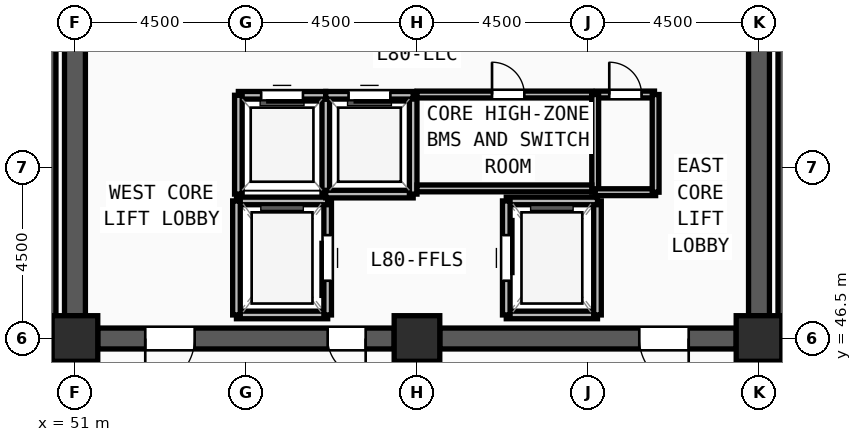
"""IFC4 building model, lengths in metres.
Left out: names, types, materials, properties, quantities, classifications, styles, units other than length and angle.
Written with IfcOpenShell. Run it as: python <this file> out.ifc"""

import sys

from ifc_helpers import new_model, si_unit, direction, frame, frame_2d, origin, origin_2d, place, context, subcontext, project, spatial, rectangle, extrude, source, transform, mapped, element, fill, save


model = new_model("IFC4")
c1 = context("Model", 3, precision=1e-05, world=origin(), true_north=direction((0.0, 1.0)))
c2 = subcontext(c1, "Body", "Model", "MODEL_VIEW")
j1 = project(units=[si_unit("LENGTHUNIT", "METRE"), si_unit("PLANEANGLEUNIT", "RADIAN")], contexts=[c1])
p1 = place(None, origin())
s1 = spatial("IfcSite", under=j1, at=p1, CompositionType="ELEMENT")
p2 = place(p1, origin())
s2 = spatial("IfcBuilding", under=s1, at=p2, CompositionType="ELEMENT")
p3 = place(p2, frame((0.0, 0.0, 309.0)))
s3 = spatial("IfcBuildingStorey", under=s2, at=p3, CompositionType="ELEMENT", Elevation=309.0)
m1 = source(origin(), c2, "Body", "SweptSolid", [
    extrude(rectangle(XDim=1.2, YDim=1.2, at=origin_2d()), origin(), (0.0, 0.0, 1.0), 3.75),
])
for number, where, z_axis, x_axis in (
    (1, (51.0, 46.5, 0.0), (0.0, 0.0, 1.0), (1.0, 0.0, 0.0)),
    (2, (60.0, 46.5, 0.0), (0.0, 0.0, 1.0), (1.0, 0.0, 0.0)),
    (3, (69.0, 46.5, 0.0), (0.0, 0.0, 1.0), (1.0, 0.0, 0.0)),
):
    element("IfcColumn", number, at=place(p3, frame(where, z_axis=z_axis, x_axis=x_axis)), inside=s3, PredefinedType="COLUMN", context=c2, shape_type="MappedRepresentation", body=[
        mapped(m1, transform((0.0, 0.0, 0.0), x_axis=(1.0, 0.0, 0.0), y_axis=(0.0, 1.0, 0.0), z_axis=(0.0, 0.0, 1.0), scale=1.0)),
    ])
p4 = place(p3, frame((69.0, 60.9, 0.0), z_axis=(0.0, 0.0, 1.0), x_axis=(0.0, -1.0, 0.0)))
e4 = element("IfcWall", 4, at=p4, inside=s3, PredefinedType="SHEAR", context=c2, shape_type="SweptSolid", body=[
    extrude(rectangle(XDim=13.8, YDim=0.55, at=frame_2d((6.9, 0.0))), origin(), (0.0, 0.0, 1.0), 3.57),
])
m2 = source(origin(), c2, "Body", "SweptSolid", [
    extrude(rectangle(XDim=1.2, YDim=2.2, at=frame_2d((0.6, 1.1))), frame((0.0, 0.285, 0.0), z_axis=(0.0, -1.0, 0.0), x_axis=(1.0, 0.0, 0.0)), (0.0, 0.0, 1.0), 0.57),
])
p5 = place(p4, frame((1.35, 0.0, 0.0)))
e5 = element("IfcOpeningElement", 5, at=p5, cuts=e4, PredefinedType="OPENING", context=c2, shape_type="MappedRepresentation", body=[
    mapped(m2, transform((0.0, 0.0, 0.0), x_axis=(1.0, 0.0, 0.0), y_axis=(0.0, 1.0, 0.0), z_axis=(0.0, 0.0, 1.0), scale=1.0)),
])
p6 = place(p3, frame((68.4, 46.5, 0.0), z_axis=(0.0, 0.0, 1.0), x_axis=(-1.0, 0.0, 0.0)))
e6 = element("IfcWall", 6, at=p6, inside=s3, PredefinedType="SHEAR", context=c2, shape_type="SweptSolid", body=[
    extrude(rectangle(XDim=7.8, YDim=0.55, at=frame_2d((3.9, 0.0))), origin(), (0.0, 0.0, 1.0), 3.57),
])
m3 = source(origin(), c2, "Body", "SweptSolid", [
    extrude(rectangle(XDim=1.3, YDim=2.2, at=frame_2d((0.65, 1.1))), frame((0.0, 0.285, 0.0), z_axis=(0.0, -1.0, 0.0), x_axis=(1.0, 0.0, 0.0)), (0.0, 0.0, 1.0), 0.57),
])
p7 = place(p6, frame((1.25, 0.0, 0.0)))
e7 = element("IfcOpeningElement", 7, at=p7, cuts=e6, PredefinedType="OPENING", context=c2, shape_type="MappedRepresentation", body=[
    mapped(m3, transform((0.0, 0.0, 0.0), x_axis=(1.0, 0.0, 0.0), y_axis=(0.0, 1.0, 0.0), z_axis=(0.0, 0.0, 1.0), scale=1.0)),
])
p8 = place(p3, frame((59.4, 46.5, 0.0), z_axis=(0.0, 0.0, 1.0), x_axis=(-1.0, 0.0, 0.0)))
e8 = element("IfcWall", 8, at=p8, inside=s3, PredefinedType="SHEAR", context=c2, shape_type="SweptSolid", body=[
    extrude(rectangle(XDim=7.8, YDim=0.55, at=frame_2d((3.9, 0.0))), origin(), (0.0, 0.0, 1.0), 3.57),
])
p9 = place(p8, frame((5.25, 0.0, 0.0)))
e9 = element("IfcOpeningElement", 9, at=p9, cuts=e8, PredefinedType="OPENING", context=c2, shape_type="MappedRepresentation", body=[
    mapped(m3, transform((0.0, 0.0, 0.0), x_axis=(1.0, 0.0, 0.0), y_axis=(0.0, 1.0, 0.0), z_axis=(0.0, 0.0, 1.0), scale=1.0)),
])
m4 = source(origin(), c2, "Body", "SweptSolid", [
    extrude(rectangle(XDim=1.0, YDim=2.2, at=frame_2d((0.5, 1.1))), frame((0.0, 0.285, 0.0), z_axis=(0.0, -1.0, 0.0), x_axis=(1.0, 0.0, 0.0)), (0.0, 0.0, 1.0), 0.57),
])
p10 = place(p8, frame((0.75, 0.0, 0.0)))
e10 = element("IfcOpeningElement", 10, at=p10, cuts=e8, PredefinedType="OPENING", context=c2, shape_type="MappedRepresentation", body=[
    mapped(m4, transform((0.0, 0.0, 0.0), x_axis=(1.0, 0.0, 0.0), y_axis=(0.0, 1.0, 0.0), z_axis=(0.0, 0.0, 1.0), scale=1.0)),
])
p11 = place(p3, frame((51.0, 47.1, 0.0), z_axis=(0.0, 0.0, 1.0), x_axis=(0.0, 1.0, 0.0)))
e11 = element("IfcWall", 11, at=p11, inside=s3, PredefinedType="SHEAR", context=c2, shape_type="SweptSolid", body=[
    extrude(rectangle(XDim=13.8, YDim=0.55, at=frame_2d((6.9, 0.0))), origin(), (0.0, 0.0, 1.0), 3.57),
])
for number, where, z_axis, x_axis in (
    (12, (50.38, 46.7, 0.0), (0.0, 0.0, 1.0), (0.0, 1.0, 0.0)),
    (13, (69.62, 54.52, 0.0), (0.0, 0.0, 1.0), (0.0, -1.0, 0.0)),
):
    element("IfcWall", number, at=place(p3, frame(where, z_axis=z_axis, x_axis=x_axis)), inside=s3, PredefinedType="SOLIDWALL", context=c2, shape_type="SweptSolid", body=[
        extrude(rectangle(XDim=7.82, YDim=0.24, at=frame_2d((3.91, 0.0))), origin(), (0.0, 0.0, 1.0), 3.57),
    ])
p12 = place(p3, frame((55.25, 47.12, 0.0), z_axis=(0.0, 0.0, 1.0), x_axis=(1.0, 0.0, 0.0)))
e14 = element("IfcWall", 14, at=p12, inside=s3, PredefinedType="SOLIDWALL", context=c2, shape_type="SweptSolid", body=[
    extrude(rectangle(XDim=2.4, YDim=0.2, at=frame_2d((1.2, 0.0))), origin(), (0.0, 0.0, 1.0), 3.57),
])
p13 = place(p3, frame((57.65, 47.12, 0.0), z_axis=(0.0, 0.0, 1.0), x_axis=(0.0, 1.0, 0.0)))
e15 = element("IfcWall", 15, at=p13, inside=s3, PredefinedType="SOLIDWALL", context=c2, shape_type="SweptSolid", body=[
    extrude(rectangle(XDim=3.0, YDim=0.2, at=frame_2d((1.5, 0.0))), origin(), (0.0, 0.0, 1.0), 3.57),
])
m5 = source(origin(), c2, "Body", "SweptSolid", [
    extrude(rectangle(XDim=1.2, YDim=2.3, at=frame_2d((0.6, 1.15))), frame((0.0, 0.11, 0.0), z_axis=(0.0, -1.0, 0.0), x_axis=(1.0, 0.0, 0.0)), (0.0, 0.0, 1.0), 0.22),
])
p14 = place(p13, frame((0.9, 0.0, 0.0)))
e16 = element("IfcOpeningElement", 16, at=p14, cuts=e15, PredefinedType="OPENING", context=c2, shape_type="MappedRepresentation", body=[
    mapped(m5, transform((0.0, 0.0, 0.0), x_axis=(1.0, 0.0, 0.0), y_axis=(0.0, 1.0, 0.0), z_axis=(0.0, 0.0, 1.0), scale=1.0)),
])
p15 = place(p3, frame((57.65, 50.12, 0.0), z_axis=(0.0, 0.0, 1.0), x_axis=(-1.0, 0.0, 0.0)))
e17 = element("IfcWall", 17, at=p15, inside=s3, PredefinedType="SOLIDWALL", context=c2, shape_type="SweptSolid", body=[
    extrude(rectangle(XDim=2.4, YDim=0.2, at=frame_2d((1.2, 0.0))), origin(), (0.0, 0.0, 1.0), 3.57),
])
p16 = place(p3, frame((55.25, 50.12, 0.0), z_axis=(0.0, 0.0, 1.0), x_axis=(0.0, -1.0, 0.0)))
e18 = element("IfcWall", 18, at=p16, inside=s3, PredefinedType="SOLIDWALL", context=c2, shape_type="SweptSolid", body=[
    extrude(rectangle(XDim=3.0, YDim=0.2, at=frame_2d((1.5, 0.0))), origin(), (0.0, 0.0, 1.0), 3.57),
])
p17 = place(p3, frame((62.35, 47.12, 0.0), z_axis=(0.0, 0.0, 1.0), x_axis=(1.0, 0.0, 0.0)))
e19 = element("IfcWall", 19, at=p17, inside=s3, PredefinedType="SOLIDWALL", context=c2, shape_type="SweptSolid", body=[
    extrude(rectangle(XDim=2.4, YDim=0.2, at=frame_2d((1.2, 0.0))), origin(), (0.0, 0.0, 1.0), 3.57),
])
p18 = place(p3, frame((64.75, 47.12, 0.0), z_axis=(0.0, 0.0, 1.0), x_axis=(0.0, 1.0, 0.0)))
e20 = element("IfcWall", 20, at=p18, inside=s3, PredefinedType="SOLIDWALL", context=c2, shape_type="SweptSolid", body=[
    extrude(rectangle(XDim=3.0, YDim=0.2, at=frame_2d((1.5, 0.0))), origin(), (0.0, 0.0, 1.0), 3.57),
])
p19 = place(p3, frame((64.75, 50.12, 0.0), z_axis=(0.0, 0.0, 1.0), x_axis=(-1.0, 0.0, 0.0)))
e21 = element("IfcWall", 21, at=p19, inside=s3, PredefinedType="SOLIDWALL", context=c2, shape_type="SweptSolid", body=[
    extrude(rectangle(XDim=2.4, YDim=0.2, at=frame_2d((1.2, 0.0))), origin(), (0.0, 0.0, 1.0), 3.57),
])
p20 = place(p3, frame((62.35, 50.12, 0.0), z_axis=(0.0, 0.0, 1.0), x_axis=(0.0, -1.0, 0.0)))
e22 = element("IfcWall", 22, at=p20, inside=s3, PredefinedType="SOLIDWALL", context=c2, shape_type="SweptSolid", body=[
    extrude(rectangle(XDim=3.0, YDim=0.2, at=frame_2d((1.5, 0.0))), origin(), (0.0, 0.0, 1.0), 3.57),
])
p21 = place(p20, frame((0.9, 0.0, 0.0)))
e23 = element("IfcOpeningElement", 23, at=p21, cuts=e22, PredefinedType="OPENING", context=c2, shape_type="MappedRepresentation", body=[
    mapped(m5, transform((0.0, 0.0, 0.0), x_axis=(1.0, 0.0, 0.0), y_axis=(0.0, 1.0, 0.0), z_axis=(0.0, 0.0, 1.0), scale=1.0)),
])
p22 = place(p3, frame((57.6, 50.3, 0.0), z_axis=(0.0, 0.0, 1.0), x_axis=(0.0, 1.0, 0.0)))
e24 = element("IfcWall", 24, at=p22, inside=s3, PredefinedType="SOLIDWALL", context=c2, shape_type="SweptSolid", body=[
    extrude(rectangle(XDim=2.6, YDim=0.2, at=frame_2d((1.3, 0.0))), origin(), (0.0, 0.0, 1.0), 3.57),
])
p23 = place(p3, frame((57.6, 52.9, 0.0), z_axis=(0.0, 0.0, 1.0), x_axis=(-1.0, 0.0, 0.0)))
e25 = element("IfcWall", 25, at=p23, inside=s3, PredefinedType="SOLIDWALL", context=c2, shape_type="SweptSolid", body=[
    extrude(rectangle(XDim=2.3, YDim=0.2, at=frame_2d((1.15, 0.0))), origin(), (0.0, 0.0, 1.0), 3.57),
])
m6 = source(origin(), c2, "Body", "SweptSolid", [
    extrude(rectangle(XDim=1.1, YDim=2.2, at=frame_2d((0.55, 1.1))), frame((0.0, 0.11, 0.0), z_axis=(0.0, -1.0, 0.0), x_axis=(1.0, 0.0, 0.0)), (0.0, 0.0, 1.0), 0.22),
])
p24 = place(p23, frame((0.6, 0.0, 0.0)))
e26 = element("IfcOpeningElement", 26, at=p24, cuts=e25, PredefinedType="OPENING", context=c2, shape_type="MappedRepresentation", body=[
    mapped(m6, transform((0.0, 0.0, 0.0), x_axis=(1.0, 0.0, 0.0), y_axis=(0.0, 1.0, 0.0), z_axis=(0.0, 0.0, 1.0), scale=1.0)),
])
p25 = place(p3, frame((55.3, 52.9, 0.0), z_axis=(0.0, 0.0, 1.0), x_axis=(0.0, -1.0, 0.0)))
e27 = element("IfcWall", 27, at=p25, inside=s3, PredefinedType="SOLIDWALL", context=c2, shape_type="SweptSolid", body=[
    extrude(rectangle(XDim=2.6, YDim=0.2, at=frame_2d((1.3, 0.0))), origin(), (0.0, 0.0, 1.0), 3.57),
])
p26 = place(p3, frame((57.6, 50.3, 0.0), z_axis=(0.0, 0.0, 1.0), x_axis=(1.0, 0.0, 0.0)))
e28 = element("IfcWall", 28, at=p26, inside=s3, PredefinedType="SOLIDWALL", context=c2, shape_type="SweptSolid", body=[
    extrude(rectangle(XDim=2.3, YDim=0.2, at=frame_2d((1.15, 0.0))), origin(), (0.0, 0.0, 1.0), 3.57),
])
p27 = place(p3, frame((59.9, 50.3, 0.0), z_axis=(0.0, 0.0, 1.0), x_axis=(0.0, 1.0, 0.0)))
e29 = element("IfcWall", 29, at=p27, inside=s3, PredefinedType="SOLIDWALL", context=c2, shape_type="SweptSolid", body=[
    extrude(rectangle(XDim=2.6, YDim=0.2, at=frame_2d((1.3, 0.0))), origin(), (0.0, 0.0, 1.0), 3.57),
])
p28 = place(p3, frame((59.9, 52.9, 0.0), z_axis=(0.0, 0.0, 1.0), x_axis=(-1.0, 0.0, 0.0)))
e30 = element("IfcWall", 30, at=p28, inside=s3, PredefinedType="SOLIDWALL", context=c2, shape_type="SweptSolid", body=[
    extrude(rectangle(XDim=2.3, YDim=0.2, at=frame_2d((1.15, 0.0))), origin(), (0.0, 0.0, 1.0), 3.57),
])
p29 = place(p28, frame((0.6, 0.0, 0.0)))
e31 = element("IfcOpeningElement", 31, at=p29, cuts=e30, PredefinedType="OPENING", context=c2, shape_type="MappedRepresentation", body=[
    mapped(m6, transform((0.0, 0.0, 0.0), x_axis=(1.0, 0.0, 0.0), y_axis=(0.0, 1.0, 0.0), z_axis=(0.0, 0.0, 1.0), scale=1.0)),
])
p30 = place(p3, frame((60.0, 52.92, 0.0), z_axis=(0.0, 0.0, 1.0), x_axis=(1.0, 0.0, 0.0)))
e32 = element("IfcWall", 32, at=p30, inside=s3, PredefinedType="PARTITIONING", context=c2, shape_type="SweptSolid", body=[
    extrude(rectangle(XDim=4.6, YDim=0.18, at=frame_2d((2.3, 0.0))), origin(), (0.0, 0.0, 1.0), 3.57),
])
m7 = source(origin(), c2, "Body", "SweptSolid", [
    extrude(rectangle(XDim=0.85, YDim=2.1, at=frame_2d((0.425, 1.05))), frame((0.0, 0.1, 0.0), z_axis=(0.0, -1.0, 0.0), x_axis=(1.0, 0.0, 0.0)), (0.0, 0.0, 1.0), 0.2),
])
p31 = place(p30, frame((1.975, 0.0, 0.0)))
e33 = element("IfcOpeningElement", 33, at=p31, cuts=e32, PredefinedType="OPENING", context=c2, shape_type="MappedRepresentation", body=[
    mapped(m7, transform((0.0, 0.0, 0.0), x_axis=(1.0, 0.0, 0.0), y_axis=(0.0, 1.0, 0.0), z_axis=(0.0, 0.0, 1.0), scale=1.0)),
])
p32 = place(p3, frame((64.72, 52.92, 0.0), z_axis=(0.0, 0.0, 1.0), x_axis=(1.0, 0.0, 0.0)))
e34 = element("IfcWall", 34, at=p32, inside=s3, PredefinedType="PARTITIONING", context=c2, shape_type="SweptSolid", body=[
    extrude(rectangle(XDim=1.53, YDim=0.18, at=frame_2d((0.765, 0.0))), origin(), (0.0, 0.0, 1.0), 3.57),
])
p33 = place(p32, frame((0.34, 0.0, 0.0)))
e35 = element("IfcOpeningElement", 35, at=p33, cuts=e34, PredefinedType="OPENING", context=c2, shape_type="MappedRepresentation", body=[
    mapped(m7, transform((0.0, 0.0, 0.0), x_axis=(1.0, 0.0, 0.0), y_axis=(0.0, 1.0, 0.0), z_axis=(0.0, 0.0, 1.0), scale=1.0)),
])
p34 = place(p3, frame((64.69, 50.35, 0.0), z_axis=(0.0, 0.0, 1.0), x_axis=(0.0, 1.0, 0.0)))
e36 = element("IfcWall", 36, at=p34, inside=s3, PredefinedType="PARTITIONING", context=c2, shape_type="SweptSolid", body=[
    extrude(rectangle(XDim=2.57, YDim=0.18, at=frame_2d((1.285, 0.0))), origin(), (0.0, 0.0, 1.0), 3.57),
])
p35 = place(p3, frame((64.69, 50.35, 0.0), z_axis=(0.0, 0.0, 1.0), x_axis=(1.0, 0.0, 0.0)))
e37 = element("IfcWall", 37, at=p35, inside=s3, PredefinedType="PARTITIONING", context=c2, shape_type="SweptSolid", body=[
    extrude(rectangle(XDim=1.59, YDim=0.18, at=frame_2d((0.795, 0.0))), origin(), (0.0, 0.0, 1.0), 3.57),
])
p36 = place(p3, frame((66.28, 50.35, 0.0), z_axis=(0.0, 0.0, 1.0), x_axis=(0.0, 1.0, 0.0)))
e38 = element("IfcWall", 38, at=p36, inside=s3, PredefinedType="PARTITIONING", context=c2, shape_type="SweptSolid", body=[
    extrude(rectangle(XDim=2.57, YDim=0.18, at=frame_2d((1.285, 0.0))), origin(), (0.0, 0.0, 1.0), 3.57),
])
p37 = place(p3, frame((60.0, 50.45, 0.0), z_axis=(0.0, 0.0, 1.0), x_axis=(1.0, 0.0, 0.0)))
e39 = element("IfcWall", 39, at=p37, inside=s3, PredefinedType="PARTITIONING", context=c2, shape_type="SweptSolid", body=[
    extrude(rectangle(XDim=4.6, YDim=0.18, at=frame_2d((2.3, 0.0))), origin(), (0.0, 0.0, 1.0), 3.57),
])
m8 = source(origin(), c2, "Body", "SweptSolid", [
    extrude(rectangle(XDim=1.3, YDim=2.2, at=frame_2d((0.65, 1.1))), frame((0.0, 0.025, 0.0), z_axis=(0.0, -1.0, 0.0), x_axis=(1.0, 0.0, 0.0)), (0.0, 0.0, 1.0), 0.05),
])
p38 = place(p9, origin())
e40 = element("IfcDoor", 40, at=p38, inside=s3, OperationType="SINGLE_SWING_RIGHT", PredefinedType="DOOR", context=c2, shape_type="MappedRepresentation", body=[
    mapped(m8, transform((0.0, 0.0, 0.0), x_axis=(1.0, 0.0, 0.0), y_axis=(0.0, 1.0, 0.0), z_axis=(0.0, 0.0, 1.0), scale=1.0)),
])
fill(e9, e40)
m9 = source(origin(), c2, "Body", "SweptSolid", [
    extrude(rectangle(XDim=1.0, YDim=2.2, at=frame_2d((0.5, 1.1))), frame((0.0, 0.025, 0.0), z_axis=(0.0, -1.0, 0.0), x_axis=(1.0, 0.0, 0.0)), (0.0, 0.0, 1.0), 0.05),
])
p39 = place(p10, origin())
e41 = element("IfcDoor", 41, at=p39, inside=s3, OperationType="SINGLE_SWING_LEFT", PredefinedType="DOOR", context=c2, shape_type="MappedRepresentation", body=[
    mapped(m9, transform((0.0, 0.0, 0.0), x_axis=(1.0, 0.0, 0.0), y_axis=(0.0, 1.0, 0.0), z_axis=(0.0, 0.0, 1.0), scale=1.0)),
])
fill(e10, e41)
p40 = place(p7, origin())
e42 = element("IfcDoor", 42, at=p40, inside=s3, OperationType="SINGLE_SWING_LEFT", PredefinedType="DOOR", context=c2, shape_type="MappedRepresentation", body=[
    mapped(m8, transform((0.0, 0.0, 0.0), x_axis=(1.0, 0.0, 0.0), y_axis=(0.0, 1.0, 0.0), z_axis=(0.0, 0.0, 1.0), scale=1.0)),
])
fill(e7, e42)
m10 = source(origin(), c2, "Body", "SweptSolid", [
    extrude(rectangle(XDim=1.2, YDim=2.3, at=frame_2d((0.6, 1.15))), frame((0.0, 0.025, 0.0), z_axis=(0.0, -1.0, 0.0), x_axis=(1.0, 0.0, 0.0)), (0.0, 0.0, 1.0), 0.05),
])
p41 = place(p14, origin())
e43 = element("IfcDoor", 43, at=p41, inside=s3, OperationType="SLIDING_TO_LEFT", PredefinedType="DOOR", context=c2, shape_type="MappedRepresentation", body=[
    mapped(m10, transform((0.0, 0.0, 0.0), x_axis=(1.0, 0.0, 0.0), y_axis=(0.0, 1.0, 0.0), z_axis=(0.0, 0.0, 1.0), scale=1.0)),
])
fill(e16, e43)
p42 = place(p21, origin())
e44 = element("IfcDoor", 44, at=p42, inside=s3, OperationType="SLIDING_TO_LEFT", PredefinedType="DOOR", context=c2, shape_type="MappedRepresentation", body=[
    mapped(m10, transform((0.0, 0.0, 0.0), x_axis=(1.0, 0.0, 0.0), y_axis=(0.0, 1.0, 0.0), z_axis=(0.0, 0.0, 1.0), scale=1.0)),
])
fill(e23, e44)
m11 = source(origin(), c2, "Body", "SweptSolid", [
    extrude(rectangle(XDim=1.1, YDim=2.2, at=frame_2d((0.55, 1.1))), frame((0.0, 0.025, 0.0), z_axis=(0.0, -1.0, 0.0), x_axis=(1.0, 0.0, 0.0)), (0.0, 0.0, 1.0), 0.05),
])
p43 = place(p24, origin())
e45 = element("IfcDoor", 45, at=p43, inside=s3, OperationType="SLIDING_TO_LEFT", PredefinedType="DOOR", context=c2, shape_type="MappedRepresentation", body=[
    mapped(m11, transform((0.0, 0.0, 0.0), x_axis=(1.0, 0.0, 0.0), y_axis=(0.0, 1.0, 0.0), z_axis=(0.0, 0.0, 1.0), scale=1.0)),
])
fill(e26, e45)
p44 = place(p29, origin())
e46 = element("IfcDoor", 46, at=p44, inside=s3, OperationType="SLIDING_TO_LEFT", PredefinedType="DOOR", context=c2, shape_type="MappedRepresentation", body=[
    mapped(m11, transform((0.0, 0.0, 0.0), x_axis=(1.0, 0.0, 0.0), y_axis=(0.0, 1.0, 0.0), z_axis=(0.0, 0.0, 1.0), scale=1.0)),
])
fill(e31, e46)
m12 = source(origin(), c2, "Body", "SweptSolid", [
    extrude(rectangle(XDim=0.85, YDim=2.1, at=frame_2d((0.425, 1.05))), frame((0.0, 0.025, 0.0), z_axis=(0.0, -1.0, 0.0), x_axis=(1.0, 0.0, 0.0)), (0.0, 0.0, 1.0), 0.05),
])
p45 = place(p31, origin())
e47 = element("IfcDoor", 47, at=p45, inside=s3, OperationType="SINGLE_SWING_LEFT", PredefinedType="DOOR", context=c2, shape_type="MappedRepresentation", body=[
    mapped(m12, transform((0.0, 0.0, 0.0), x_axis=(1.0, 0.0, 0.0), y_axis=(0.0, 1.0, 0.0), z_axis=(0.0, 0.0, 1.0), scale=1.0)),
])
fill(e33, e47)
p46 = place(p33, origin())
e48 = element("IfcDoor", 48, at=p46, inside=s3, OperationType="SINGLE_SWING_LEFT", PredefinedType="DOOR", context=c2, shape_type="MappedRepresentation", body=[
    mapped(m12, transform((0.0, 0.0, 0.0), x_axis=(1.0, 0.0, 0.0), y_axis=(0.0, 1.0, 0.0), z_axis=(0.0, 0.0, 1.0), scale=1.0)),
])
fill(e35, e48)
save(model, sys.argv[1])
